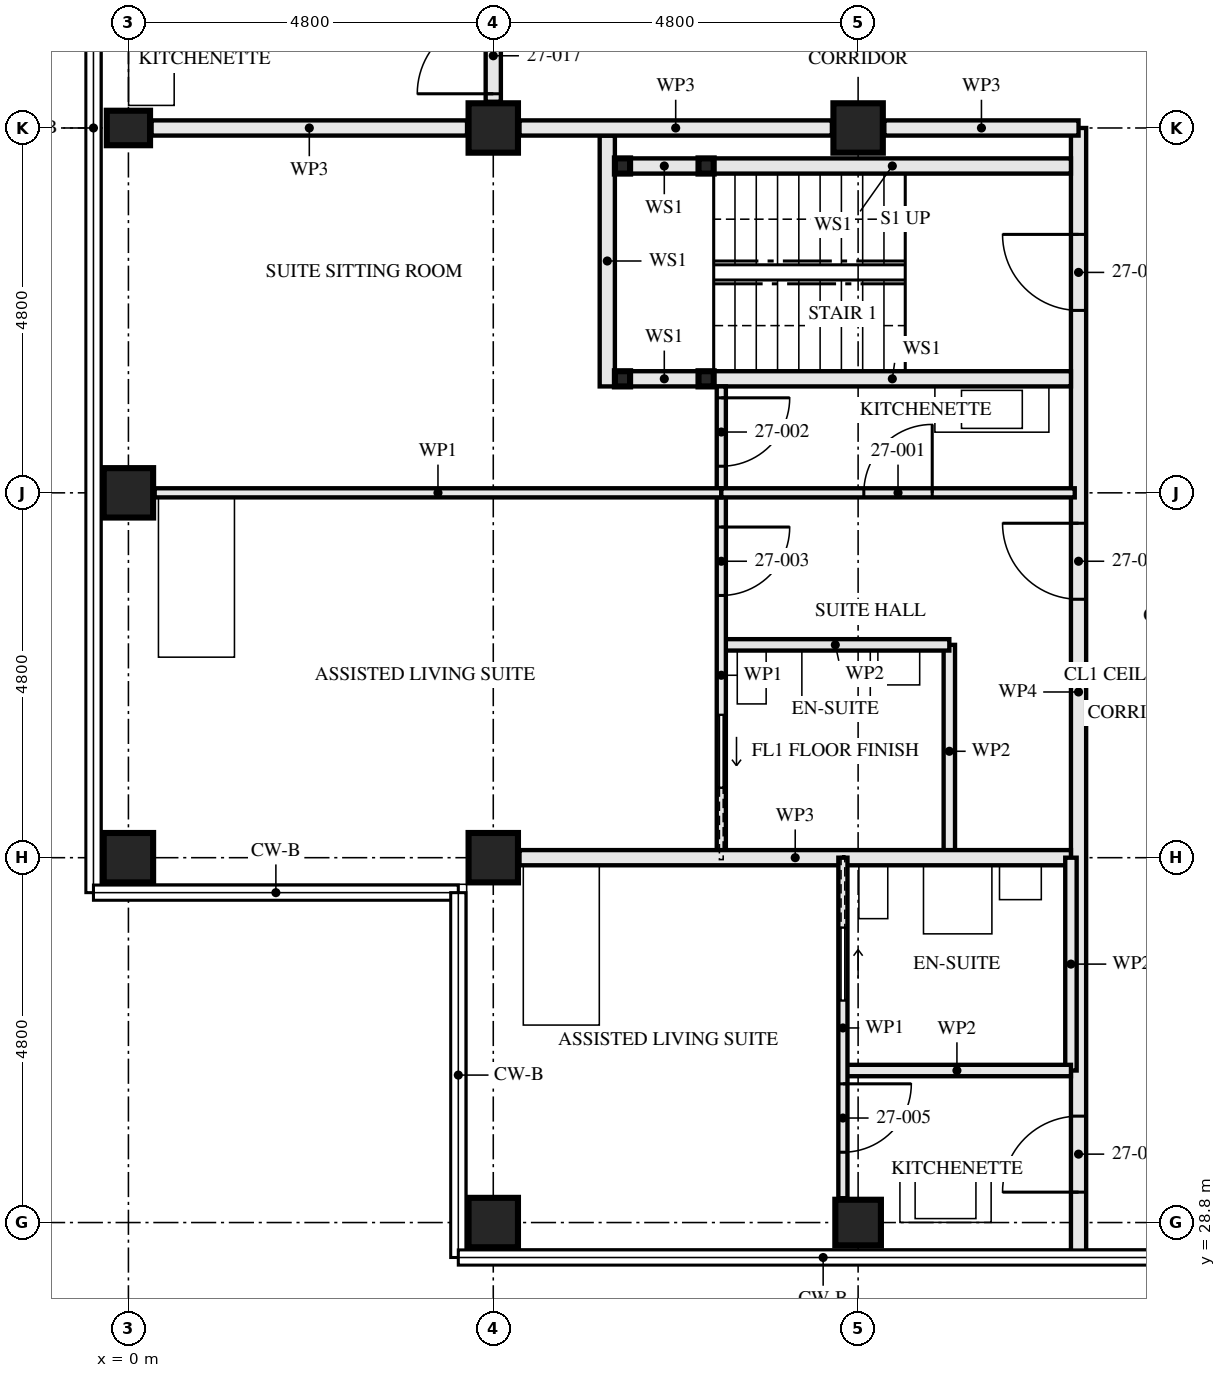
"""IFC4 building model, lengths in metres.
Left out: names, types, materials, properties, quantities, classifications, styles, units other than length and angle.
Written with IfcOpenShell. Run it as: python <this file> out.ifc"""

import sys

from ifc_helpers import new_model, si_unit, direction, frame, frame_2d, origin, origin_2d, place, context, subcontext, project, spatial, rectangle, hollow_rectangle, i_section, extrude, element, fill, save


model = new_model("IFC4")
c1 = context("Model", 3, precision=1e-05, world=origin(), true_north=direction((0.0, 1.0)))
c2 = subcontext(c1, "Body", "Model", "MODEL_VIEW")
j1 = project(units=[si_unit("LENGTHUNIT", "METRE"), si_unit("PLANEANGLEUNIT", "RADIAN")], contexts=[c1])
p1 = place(None, origin())
s1 = spatial("IfcSite", under=j1, at=p1, CompositionType="ELEMENT")
p2 = place(p1, origin())
s2 = spatial("IfcBuilding", under=s1, at=p2, CompositionType="ELEMENT")
p3 = place(p2, frame((0.0, 0.0, 101.5)))
s3 = spatial("IfcBuildingStorey", under=s2, at=p3, CompositionType="ELEMENT", Elevation=101.5)
for number, where, z_axis, x_axis in (
    (1, (0.0, 33.6, 0.0), (0.0, 0.0, 1.0), (0.0, 1.0, 0.0)),
    (2, (0.0, 38.4, 0.0), (0.0, 0.0, 1.0), (1.0, 0.0, 0.0)),
):
    element("IfcColumn", number, at=place(p3, frame(where, z_axis=z_axis, x_axis=x_axis)), inside=s3, PredefinedType="COLUMN", context=c2, shape_type="SweptSolid", body=[
        extrude(hollow_rectangle(XDim=0.65, YDim=0.65, WallThickness=0.08, at=origin_2d()), origin(), (0.0, 0.0, 1.0), 3.5),
    ])
p4 = place(p3, frame((0.0, 43.2, 0.0), z_axis=(0.0, 0.0, 1.0), x_axis=(0.0, 1.0, 0.0)))
e3 = element("IfcColumn", 3, at=p4, inside=s3, PredefinedType="COLUMN", context=c2, shape_type="SweptSolid", body=[
    extrude(i_section(OverallWidth=0.454, OverallDepth=0.569, WebThickness=0.078, FlangeThickness=0.125, FilletRadius=0.015, at=origin_2d()), origin(), (0.0, 0.0, 1.0), 3.5),
])
for number, where, z_axis, x_axis in (
    (4, (4.8, 28.8, 0.0), (0.0, 0.0, 1.0), (0.0, 1.0, 0.0)),
    (5, (4.8, 33.6, 0.0), (0.0, 0.0, 1.0), (0.0, 1.0, 0.0)),
):
    element("IfcColumn", number, at=place(p3, frame(where, z_axis=z_axis, x_axis=x_axis)), inside=s3, PredefinedType="COLUMN", context=c2, shape_type="SweptSolid", body=[
        extrude(hollow_rectangle(XDim=0.65, YDim=0.65, WallThickness=0.08, at=origin_2d()), origin(), (0.0, 0.0, 1.0), 3.5),
    ])
p5 = place(p3, frame((4.8, 43.2, 0.0), z_axis=(0.0, 0.0, 1.0), x_axis=(0.0, 1.0, 0.0)))
e6 = element("IfcColumn", 6, at=p5, inside=s3, PredefinedType="COLUMN", context=c2, shape_type="SweptSolid", body=[
    extrude(hollow_rectangle(XDim=0.65, YDim=0.65, WallThickness=0.05, at=origin_2d()), origin(), (0.0, 0.0, 1.0), 3.5),
])
p6 = place(p3, frame((9.6, 28.8, 0.0), z_axis=(0.0, 0.0, 1.0), x_axis=(0.0, 1.0, 0.0)))
e7 = element("IfcColumn", 7, at=p6, inside=s3, PredefinedType="COLUMN", context=c2, shape_type="SweptSolid", body=[
    extrude(hollow_rectangle(XDim=0.6, YDim=0.6, WallThickness=0.08, at=origin_2d()), origin(), (0.0, 0.0, 1.0), 3.5),
])
p7 = place(p3, frame((9.6, 43.2, 0.0), z_axis=(0.0, 0.0, 1.0), x_axis=(0.0, 1.0, 0.0)))
e8 = element("IfcColumn", 8, at=p7, inside=s3, PredefinedType="COLUMN", context=c2, shape_type="SweptSolid", body=[
    extrude(hollow_rectangle(XDim=0.65, YDim=0.65, WallThickness=0.05, at=origin_2d()), origin(), (0.0, 0.0, 1.0), 3.5),
])
for number, where, z_axis, x_axis in (
    (9, (6.5, 42.7, 0.0), (0.0, 0.0, 1.0), (1.0, 0.0, 0.0)),
    (10, (6.5, 39.9, 0.0), (0.0, 0.0, 1.0), (1.0, 0.0, 0.0)),
    (11, (7.6, 42.7, 0.0), (0.0, 0.0, 1.0), (1.0, 0.0, 0.0)),
    (12, (7.6, 39.9, 0.0), (0.0, 0.0, 1.0), (1.0, 0.0, 0.0)),
):
    element("IfcColumn", number, at=place(p3, frame(where, z_axis=z_axis, x_axis=x_axis)), inside=s3, PredefinedType="COLUMN", context=c2, shape_type="SweptSolid", body=[
        extrude(hollow_rectangle(XDim=0.2, YDim=0.2, WallThickness=0.008, at=origin_2d()), origin(), (0.0, 0.0, 1.0), 3.33),
    ])
p8 = place(p3, frame((6.6, 42.7, 0.0), z_axis=(0.0, 0.0, 1.0), x_axis=(1.0, 0.0, 0.0)))
e13 = element("IfcWall", 13, at=p8, inside=s3, PredefinedType="SOLIDWALL", context=c2, shape_type="SweptSolid", body=[
    extrude(rectangle(XDim=0.9, YDim=0.2, at=frame_2d((0.45, 0.0))), origin(), (0.0, 0.0, 1.0), 2.99),
])
p9 = place(p3, frame((7.7, 42.7, 0.0), z_axis=(0.0, 0.0, 1.0), x_axis=(1.0, 0.0, 0.0)))
e14 = element("IfcWall", 14, at=p9, inside=s3, PredefinedType="SOLIDWALL", context=c2, shape_type="SweptSolid", body=[
    extrude(rectangle(XDim=4.7, YDim=0.2, at=frame_2d((2.35, 0.0))), origin(), (0.0, 0.0, 1.0), 2.99),
])
p10 = place(p3, frame((6.6, 39.9, 0.0), z_axis=(0.0, 0.0, 1.0), x_axis=(1.0, 0.0, 0.0)))
e15 = element("IfcWall", 15, at=p10, inside=s3, PredefinedType="SOLIDWALL", context=c2, shape_type="SweptSolid", body=[
    extrude(rectangle(XDim=0.9, YDim=0.2, at=frame_2d((0.45, 0.0))), origin(), (0.0, 0.0, 1.0), 2.99),
])
p11 = place(p3, frame((7.7, 39.9, 0.0), z_axis=(0.0, 0.0, 1.0), x_axis=(1.0, 0.0, 0.0)))
e16 = element("IfcWall", 16, at=p11, inside=s3, PredefinedType="SOLIDWALL", context=c2, shape_type="SweptSolid", body=[
    extrude(rectangle(XDim=4.7, YDim=0.2, at=frame_2d((2.35, 0.0))), origin(), (0.0, 0.0, 1.0), 2.99),
])
p12 = place(p3, frame((6.3, 43.1, 0.0), z_axis=(0.0, 0.0, 1.0), x_axis=(0.0, -1.0, 0.0)))
e17 = element("IfcWall", 17, at=p12, inside=s3, PredefinedType="SOLIDWALL", context=c2, shape_type="SweptSolid", body=[
    extrude(rectangle(XDim=3.3, YDim=0.2, at=frame_2d((1.65, 0.0))), origin(), (0.0, 0.0, 1.0), 3.33),
])
p13 = place(p3, frame((7.8, 36.4, 0.0), z_axis=(0.0, 0.0, 1.0), x_axis=(1.0, 0.0, 0.0)))
e18 = element("IfcWall", 18, at=p13, inside=s3, PredefinedType="PARTITIONING", context=c2, shape_type="SweptSolid", body=[
    extrude(rectangle(XDim=3.0, YDim=0.15, at=frame_2d((1.5, 0.0))), origin(), (0.0, 0.0, 1.0), 3.33),
])
p14 = place(p3, frame((10.8, 36.4, 0.0), z_axis=(0.0, 0.0, 1.0), x_axis=(0.0, -1.0, 0.0)))
e19 = element("IfcWall", 19, at=p14, inside=s3, PredefinedType="PARTITIONING", context=c2, shape_type="SweptSolid", body=[
    extrude(rectangle(XDim=2.8, YDim=0.15, at=frame_2d((1.4, 0.0))), origin(), (0.0, 0.0, 1.0), 3.33),
])
p15 = place(p3, frame((7.8, 38.4, 0.0), z_axis=(0.0, 0.0, 1.0), x_axis=(1.0, 0.0, 0.0)))
e20 = element("IfcWall", 20, at=p15, inside=s3, PredefinedType="PARTITIONING", context=c2, shape_type="SweptSolid", body=[
    extrude(rectangle(XDim=4.65, YDim=0.12, at=frame_2d((2.325, 0.0))), origin(), (0.0, 0.0, 1.0), 2.55),
])
p16 = place(p15, frame((1.875, 0.0, 0.0)))
e21 = element("IfcOpeningElement", 21, at=p16, cuts=e20, PredefinedType="OPENING", context=c2, shape_type="SweptSolid", body=[
    extrude(rectangle(XDim=0.9, YDim=2.1, at=frame_2d((0.45, 1.05))), frame((0.0, 0.071, 0.0), z_axis=(0.0, -1.0, 0.0), x_axis=(1.0, 0.0, 0.0)), (0.0, 0.0, 1.0), 0.141),
])
p17 = place(p3, frame((7.8, 39.8, 0.0), z_axis=(0.0, 0.0, 1.0), x_axis=(0.0, -1.0, 0.0)))
e22 = element("IfcWall", 22, at=p17, inside=s3, PredefinedType="PARTITIONING", context=c2, shape_type="SweptSolid", body=[
    extrude(rectangle(XDim=1.4, YDim=0.12, at=frame_2d((0.7, 0.0))), origin(), (0.0, 0.0, 1.0), 3.33),
])
p18 = place(p17, frame((0.15, 0.0, 0.0)))
e23 = element("IfcOpeningElement", 23, at=p18, cuts=e22, PredefinedType="OPENING", context=c2, shape_type="SweptSolid", body=[
    extrude(rectangle(XDim=0.9, YDim=2.1, at=frame_2d((0.45, 1.05))), frame((0.0, 0.071, 0.0), z_axis=(0.0, -1.0, 0.0), x_axis=(1.0, 0.0, 0.0)), (0.0, 0.0, 1.0), 0.141),
])
p19 = place(p3, frame((7.8, 38.4, 0.0), z_axis=(0.0, 0.0, 1.0), x_axis=(0.0, -1.0, 0.0)))
e24 = element("IfcWall", 24, at=p19, inside=s3, PredefinedType="PARTITIONING", context=c2, shape_type="SweptSolid", body=[
    extrude(rectangle(XDim=4.8, YDim=0.12, at=frame_2d((2.4, 0.0))), origin(), (0.0, 0.0, 1.0), 3.33),
])
p20 = place(p19, frame((0.45, 0.0, 0.0)))
e25 = element("IfcOpeningElement", 25, at=p20, cuts=e24, PredefinedType="OPENING", context=c2, shape_type="SweptSolid", body=[
    extrude(rectangle(XDim=0.9, YDim=2.1, at=frame_2d((0.45, 1.05))), frame((0.0, 0.071, 0.0), z_axis=(0.0, -1.0, 0.0), x_axis=(1.0, 0.0, 0.0)), (0.0, 0.0, 1.0), 0.141),
])
p21 = place(p19, frame((2.925, 0.0, 0.0)))
e26 = element("IfcOpeningElement", 26, at=p21, cuts=e24, PredefinedType="OPENING", context=c2, shape_type="SweptSolid", body=[
    extrude(rectangle(XDim=0.95, YDim=2.1, at=frame_2d((0.475, 1.05))), frame((0.0, 0.071, 0.0), z_axis=(0.0, -1.0, 0.0), x_axis=(1.0, 0.0, 0.0)), (0.0, 0.0, 1.0), 0.141),
])
p22 = place(p3, frame((0.345, 38.4, 0.0), z_axis=(0.0, 0.0, 1.0), x_axis=(1.0, 0.0, 0.0)))
e27 = element("IfcWall", 27, at=p22, inside=s3, PredefinedType="PARTITIONING", context=c2, shape_type="SweptSolid", body=[
    extrude(rectangle(XDim=7.455, YDim=0.12, at=frame_2d((3.728, 0.0))), origin(), (0.0, 0.0, 1.0), 2.55),
])
p23 = place(p3, frame((5.145, 33.6, 0.0), z_axis=(0.0, 0.0, 1.0), x_axis=(1.0, 0.0, 0.0)))
e28 = element("IfcWall", 28, at=p23, inside=s3, PredefinedType="PARTITIONING", context=c2, shape_type="SweptSolid", body=[
    extrude(rectangle(XDim=7.255, YDim=0.2, at=frame_2d((3.627, 0.0))), origin(), (0.0, 0.0, 1.0), 2.55),
])
p24 = place(p3, frame((9.4, 30.8, 0.0), z_axis=(0.0, 0.0, 1.0), x_axis=(1.0, 0.0, 0.0)))
e29 = element("IfcWall", 29, at=p24, inside=s3, PredefinedType="PARTITIONING", context=c2, shape_type="SweptSolid", body=[
    extrude(rectangle(XDim=3.0, YDim=0.15, at=frame_2d((1.5, 0.0))), origin(), (0.0, 0.0, 1.0), 3.33),
])
p25 = place(p3, frame((12.4, 33.6, 0.0), z_axis=(0.0, 0.0, 1.0), x_axis=(0.0, -1.0, 0.0)))
e30 = element("IfcWall", 30, at=p25, inside=s3, PredefinedType="PARTITIONING", context=c2, shape_type="SweptSolid", body=[
    extrude(rectangle(XDim=2.8, YDim=0.15, at=frame_2d((1.4, 0.0))), origin(), (0.0, 0.0, 1.0), 3.33),
])
p26 = place(p3, frame((9.4, 33.6, 0.0), z_axis=(0.0, 0.0, 1.0), x_axis=(0.0, -1.0, 0.0)))
e31 = element("IfcWall", 31, at=p26, inside=s3, PredefinedType="PARTITIONING", context=c2, shape_type="SweptSolid", body=[
    extrude(rectangle(XDim=4.48, YDim=0.12, at=frame_2d((2.24, 0.0))), origin(), (0.0, 0.0, 1.0), 3.33),
])
p27 = place(p26, frame((2.975, 0.0, 0.0)))
e32 = element("IfcOpeningElement", 32, at=p27, cuts=e31, PredefinedType="OPENING", context=c2, shape_type="SweptSolid", body=[
    extrude(rectangle(XDim=0.9, YDim=2.1, at=frame_2d((0.45, 1.05))), frame((0.0, 0.071, 0.0), z_axis=(0.0, -1.0, 0.0), x_axis=(1.0, 0.0, 0.0)), (0.0, 0.0, 1.0), 0.141),
])
p28 = place(p26, frame((0.925, 0.0, 0.0)))
e33 = element("IfcOpeningElement", 33, at=p28, cuts=e31, PredefinedType="OPENING", context=c2, shape_type="SweptSolid", body=[
    extrude(rectangle(XDim=0.95, YDim=2.1, at=frame_2d((0.475, 1.05))), frame((0.0, 0.071, 0.0), z_axis=(0.0, -1.0, 0.0), x_axis=(1.0, 0.0, 0.0)), (0.0, 0.0, 1.0), 0.141),
])
p29 = place(p3, frame((12.5, 43.2, 0.0), z_axis=(0.0, 0.0, 1.0), x_axis=(0.0, -1.0, 0.0)))
e34 = element("IfcWall", 34, at=p29, inside=s3, PredefinedType="PARTITIONING", context=c2, shape_type="SweptSolid", body=[
    extrude(rectangle(XDim=14.84, YDim=0.2, at=frame_2d((7.42, 0.0))), origin(), (0.0, 0.0, 1.0), 2.32),
])
p30 = place(p29, frame((1.4, 0.0, 0.0)))
e35 = element("IfcOpeningElement", 35, at=p30, cuts=e34, PredefinedType="OPENING", context=c2, shape_type="SweptSolid", body=[
    extrude(rectangle(XDim=1.0, YDim=2.1, at=frame_2d((0.5, 1.05))), frame((0.0, 0.111, 0.0), z_axis=(0.0, -1.0, 0.0), x_axis=(1.0, 0.0, 0.0)), (0.0, 0.0, 1.0), 0.221),
])
p31 = place(p29, frame((5.2, 0.0, 0.0)))
e36 = element("IfcOpeningElement", 36, at=p31, cuts=e34, PredefinedType="OPENING", context=c2, shape_type="SweptSolid", body=[
    extrude(rectangle(XDim=1.0, YDim=2.1, at=frame_2d((0.5, 1.05))), frame((0.0, 0.111, 0.0), z_axis=(0.0, -1.0, 0.0), x_axis=(1.0, 0.0, 0.0)), (0.0, 0.0, 1.0), 0.221),
])
p32 = place(p29, frame((13.0, 0.0, 0.0)))
e37 = element("IfcOpeningElement", 37, at=p32, cuts=e34, PredefinedType="OPENING", context=c2, shape_type="SweptSolid", body=[
    extrude(rectangle(XDim=1.0, YDim=2.1, at=frame_2d((0.5, 1.05))), frame((0.0, 0.111, 0.0), z_axis=(0.0, -1.0, 0.0), x_axis=(1.0, 0.0, 0.0)), (0.0, 0.0, 1.0), 0.221),
])
p33 = place(p3, frame((4.8, 45.2, 0.0), z_axis=(0.0, 0.0, 1.0), x_axis=(0.0, -1.0, 0.0)))
e38 = element("IfcWall", 38, at=p33, inside=s3, PredefinedType="PARTITIONING", context=c2, shape_type="SweptSolid", body=[
    extrude(rectangle(XDim=1.655, YDim=0.2, at=frame_2d((0.828, 0.0))), origin(), (0.0, 0.0, 1.0), 3.33),
])
p34 = place(p33, frame((0.55, 0.0, 0.0)))
e39 = element("IfcOpeningElement", 39, at=p34, cuts=e38, PredefinedType="OPENING", context=c2, shape_type="SweptSolid", body=[
    extrude(rectangle(XDim=1.0, YDim=2.1, at=frame_2d((0.5, 1.05))), frame((0.0, 0.111, 0.0), z_axis=(0.0, -1.0, 0.0), x_axis=(1.0, 0.0, 0.0)), (0.0, 0.0, 1.0), 0.221),
])
p35 = place(p3, frame((12.5, 43.2, 0.0), z_axis=(0.0, 0.0, 1.0), x_axis=(-1.0, 0.0, 0.0)))
e40 = element("IfcWall", 40, at=p35, inside=s3, PredefinedType="PARTITIONING", context=c2, shape_type="SweptSolid", body=[
    extrude(rectangle(XDim=2.555, YDim=0.2, at=frame_2d((1.277, 0.0))), origin(), (0.0, 0.0, 1.0), 2.32),
])
p36 = place(p3, frame((9.255, 43.2, 0.0), z_axis=(0.0, 0.0, 1.0), x_axis=(-1.0, 0.0, 0.0)))
e41 = element("IfcWall", 41, at=p36, inside=s3, PredefinedType="PARTITIONING", context=c2, shape_type="SweptSolid", body=[
    extrude(rectangle(XDim=4.11, YDim=0.2, at=frame_2d((2.055, 0.0))), origin(), (0.0, 0.0, 1.0), 2.32),
])
p37 = place(p3, frame((4.455, 43.2, 0.0), z_axis=(0.0, 0.0, 1.0), x_axis=(-1.0, 0.0, 0.0)))
e42 = element("IfcWall", 42, at=p37, inside=s3, PredefinedType="PARTITIONING", context=c2, shape_type="SweptSolid", body=[
    extrude(rectangle(XDim=4.151, YDim=0.2, at=frame_2d((2.075, 0.0))), origin(), (0.0, 0.0, 1.0), 2.32),
])
p38 = place(p16, origin())
e43 = element("IfcDoor", 43, at=p38, inside=s3, OperationType="SINGLE_SWING_LEFT", PredefinedType="DOOR", context=c2, shape_type="SweptSolid", body=[
    extrude(rectangle(XDim=0.9, YDim=2.1, at=frame_2d((0.45, 1.05))), frame((0.0, 0.022, 0.0), z_axis=(0.0, -1.0, 0.0), x_axis=(1.0, 0.0, 0.0)), (0.0, 0.0, 1.0), 0.044),
])
fill(e21, e43)
p39 = place(p18, origin())
e44 = element("IfcDoor", 44, at=p39, inside=s3, OperationType="SINGLE_SWING_RIGHT", PredefinedType="DOOR", context=c2, shape_type="SweptSolid", body=[
    extrude(rectangle(XDim=0.9, YDim=2.1, at=frame_2d((0.45, 1.05))), frame((0.0, 0.022, 0.0), z_axis=(0.0, -1.0, 0.0), x_axis=(1.0, 0.0, 0.0)), (0.0, 0.0, 1.0), 0.044),
])
fill(e23, e44)
p40 = place(p20, origin())
e45 = element("IfcDoor", 45, at=p40, inside=s3, OperationType="SINGLE_SWING_RIGHT", PredefinedType="DOOR", context=c2, shape_type="SweptSolid", body=[
    extrude(rectangle(XDim=0.9, YDim=2.1, at=frame_2d((0.45, 1.05))), frame((0.0, 0.022, 0.0), z_axis=(0.0, -1.0, 0.0), x_axis=(1.0, 0.0, 0.0)), (0.0, 0.0, 1.0), 0.044),
])
fill(e25, e45)
p41 = place(p21, origin())
e46 = element("IfcDoor", 46, at=p41, inside=s3, OperationType="SLIDING_TO_LEFT", PredefinedType="DOOR", context=c2, shape_type="SweptSolid", body=[
    extrude(rectangle(XDim=0.95, YDim=2.1, at=frame_2d((0.475, 1.05))), frame((0.0, 0.022, 0.0), z_axis=(0.0, -1.0, 0.0), x_axis=(1.0, 0.0, 0.0)), (0.0, 0.0, 1.0), 0.044),
])
fill(e26, e46)
p42 = place(p27, origin())
e47 = element("IfcDoor", 47, at=p42, inside=s3, OperationType="SINGLE_SWING_RIGHT", PredefinedType="DOOR", context=c2, shape_type="SweptSolid", body=[
    extrude(rectangle(XDim=0.9, YDim=2.1, at=frame_2d((0.45, 1.05))), frame((0.0, 0.022, 0.0), z_axis=(0.0, -1.0, 0.0), x_axis=(1.0, 0.0, 0.0)), (0.0, 0.0, 1.0), 0.044),
])
fill(e32, e47)
p43 = place(p28, origin())
e48 = element("IfcDoor", 48, at=p43, inside=s3, OperationType="SLIDING_TO_RIGHT", PredefinedType="DOOR", context=c2, shape_type="SweptSolid", body=[
    extrude(rectangle(XDim=0.95, YDim=2.1, at=frame_2d((0.475, 1.05))), frame((0.0, 0.022, 0.0), z_axis=(0.0, -1.0, 0.0), x_axis=(1.0, 0.0, 0.0)), (0.0, 0.0, 1.0), 0.044),
])
fill(e33, e48)
p44 = place(p30, frame((1.0, 0.0, 0.0), z_axis=(0.0, 0.0, 1.0), x_axis=(-1.0, 0.0, 0.0)))
e49 = element("IfcDoor", 49, at=p44, inside=s3, OperationType="SINGLE_SWING_LEFT", PredefinedType="DOOR", context=c2, shape_type="SweptSolid", body=[
    extrude(rectangle(XDim=1.0, YDim=2.1, at=frame_2d((0.5, 1.05))), frame((0.0, 0.032, 0.0), z_axis=(0.0, -1.0, 0.0), x_axis=(1.0, 0.0, 0.0)), (0.0, 0.0, 1.0), 0.064),
])
fill(e35, e49)
p45 = place(p31, frame((1.0, 0.0, 0.0), z_axis=(0.0, 0.0, 1.0), x_axis=(-1.0, 0.0, 0.0)))
e50 = element("IfcDoor", 50, at=p45, inside=s3, OperationType="SINGLE_SWING_LEFT", PredefinedType="DOOR", context=c2, shape_type="SweptSolid", body=[
    extrude(rectangle(XDim=1.0, YDim=2.1, at=frame_2d((0.5, 1.05))), frame((0.0, 0.027, 0.0), z_axis=(0.0, -1.0, 0.0), x_axis=(1.0, 0.0, 0.0)), (0.0, 0.0, 1.0), 0.054),
])
fill(e36, e50)
p46 = place(p32, frame((1.0, 0.0, 0.0), z_axis=(0.0, 0.0, 1.0), x_axis=(-1.0, 0.0, 0.0)))
e51 = element("IfcDoor", 51, at=p46, inside=s3, OperationType="SINGLE_SWING_RIGHT", PredefinedType="DOOR", context=c2, shape_type="SweptSolid", body=[
    extrude(rectangle(XDim=1.0, YDim=2.1, at=frame_2d((0.5, 1.05))), frame((0.0, 0.027, 0.0), z_axis=(0.0, -1.0, 0.0), x_axis=(1.0, 0.0, 0.0)), (0.0, 0.0, 1.0), 0.054),
])
fill(e37, e51)
p47 = place(p34, frame((1.0, 0.0, 0.0), z_axis=(0.0, 0.0, 1.0), x_axis=(-1.0, 0.0, 0.0)))
e52 = element("IfcDoor", 52, at=p47, inside=s3, OperationType="SINGLE_SWING_RIGHT", PredefinedType="DOOR", context=c2, shape_type="SweptSolid", body=[
    extrude(rectangle(XDim=1.0, YDim=2.1, at=frame_2d((0.5, 1.05))), frame((0.0, 0.027, 0.0), z_axis=(0.0, -1.0, 0.0), x_axis=(1.0, 0.0, 0.0)), (0.0, 0.0, 1.0), 0.054),
])
fill(e39, e52)
save(model, sys.argv[1])
